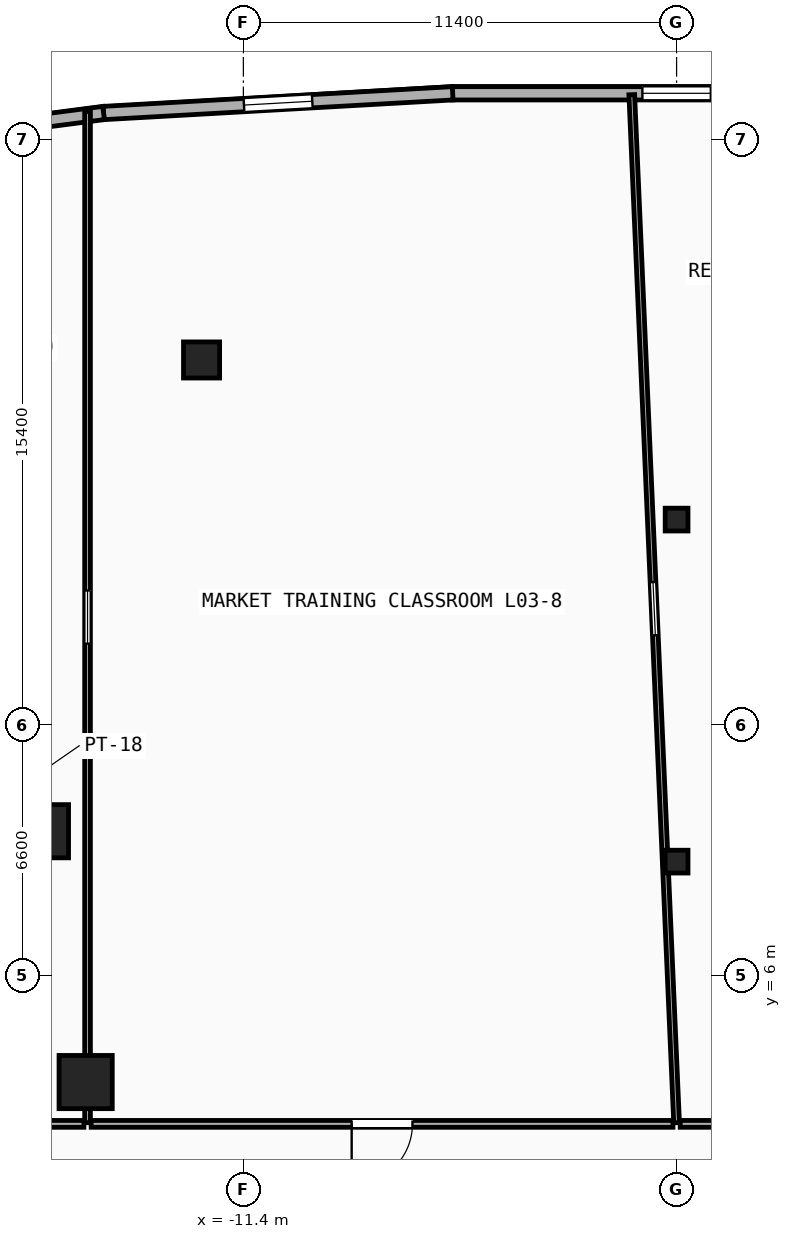
"""IFC4 building model, lengths in metres.
Left out: names, types, materials, properties, quantities, classifications, styles, units other than length and angle.
Written with IfcOpenShell. Run it as: python <this file> out.ifc"""

import sys

from ifc_helpers import new_model, si_unit, direction, frame, frame_2d, origin, origin_2d, place, context, subcontext, project, spatial, rectangle, hollow_rectangle, circle, extrude, element, fill, save


model = new_model("IFC4")
c1 = context("Model", 3, precision=1e-05, world=origin(), true_north=direction((0.0, 1.0)))
c2 = subcontext(c1, "Body", "Model", "MODEL_VIEW")
j1 = project(units=[si_unit("LENGTHUNIT", "METRE"), si_unit("PLANEANGLEUNIT", "RADIAN")], contexts=[c1])
p1 = place(None, origin())
s1 = spatial("IfcSite", under=j1, at=p1, CompositionType="ELEMENT")
p2 = place(p1, origin())
s2 = spatial("IfcBuilding", under=s1, at=p2, CompositionType="ELEMENT")
p3 = place(p2, frame((0.0, 0.0, 16.0)))
s3 = spatial("IfcBuildingStorey", under=s2, at=p3, CompositionType="ELEMENT", Elevation=16.0)
for number, where, z_axis, x_axis in (
    (1, (-15.55, 3.2, 0.0), (0.0, 0.0, 1.0), (1.0, 0.0, 0.0)),
    (2, (-16.7, 9.8, 0.0), (0.0, 0.0, 1.0), (1.0, 0.0, 0.0)),
):
    element("IfcColumn", number, at=place(p3, frame(where, z_axis=z_axis, x_axis=x_axis)), inside=s3, PredefinedType="COLUMN", context=c2, shape_type="SweptSolid", body=[
        extrude(rectangle(XDim=1.4, YDim=1.4, at=origin_2d()), origin(), (0.0, 0.0, 1.0), 4.0),
    ])
for number, where, z_axis, x_axis in (
    (3, (0.0, 9.0, 0.0), (0.0, 0.0, 1.0), (1.0, 0.0, 0.0)),
    (4, (0.0, 18.0, 0.0), (0.0, 0.0, 1.0), (1.0, 0.0, 0.0)),
):
    element("IfcColumn", number, at=place(p3, frame(where, z_axis=z_axis, x_axis=x_axis)), inside=s3, PredefinedType="COLUMN", context=c2, shape_type="SweptSolid", body=[
        extrude(hollow_rectangle(XDim=0.6, YDim=0.6, WallThickness=0.032, at=origin_2d()), origin(), (0.0, 0.0, 1.0), 4.0),
    ])
p4 = place(p3, frame((-12.5, 22.2, 0.0), z_axis=(0.0, 0.0, 1.0), x_axis=(1.0, 0.0, 0.0)))
e5 = element("IfcColumn", 5, at=p4, inside=s3, PredefinedType="PILASTER", context=c2, shape_type="SweptSolid", body=[
    extrude(circle(Radius=0.475, at=origin_2d()), origin(), (0.0, 0.0, 1.0), 4.0),
])
p5 = place(p3, frame((5.893, 29.216, 0.0), z_axis=(0.0, 0.0, 1.0), x_axis=(-1.0, 0.0, 0.0)))
e6 = element("IfcWall", 6, at=p5, inside=s3, PredefinedType="SOLIDWALL", context=c2, shape_type="SweptSolid", body=[
    extrude(rectangle(XDim=11.785, YDim=0.35, at=frame_2d((5.893, 0.0))), origin(), (0.0, 0.0, 1.0), 3.65),
])
p6 = place(p5, frame((4.992, 0.0, 0.85)))
e7 = element("IfcOpeningElement", 7, at=p6, cuts=e6, PredefinedType="OPENING", context=c2, shape_type="SweptSolid", body=[
    extrude(rectangle(XDim=1.8, YDim=2.4, at=frame_2d((0.9, 1.2))), frame((0.0, 0.185, 0.0), z_axis=(0.0, -1.0, 0.0), x_axis=(1.0, 0.0, 0.0)), (0.0, 0.0, 1.0), 0.37),
])
p7 = place(p3, frame((-5.893, 29.216, 0.0), z_axis=(0.0, 0.0, 1.0), x_axis=(-0.998413463137, -0.056307695976, 0.0)))
e8 = element("IfcWall", 8, at=p7, inside=s3, PredefinedType="SOLIDWALL", context=c2, shape_type="SweptSolid", body=[
    extrude(rectangle(XDim=9.201, YDim=0.35, at=frame_2d((4.6, 0.0))), origin(), (0.0, 0.0, 1.0), 3.65),
])
p8 = place(p7, frame((3.7, 0.0, 0.85)))
e9 = element("IfcOpeningElement", 9, at=p8, cuts=e8, PredefinedType="OPENING", context=c2, shape_type="SweptSolid", body=[
    extrude(rectangle(XDim=1.8, YDim=2.4, at=frame_2d((0.9, 1.2))), frame((0.0, 0.185, 0.0), z_axis=(0.0, -1.0, 0.0), x_axis=(1.0, 0.0, 0.0)), (0.0, 0.0, 1.0), 0.37),
])
p9 = place(p3, frame((-15.079, 28.698, 0.0), z_axis=(0.0, 0.0, 1.0), x_axis=(-0.991688106477, -0.128665067026, 0.0)))
e10 = element("IfcWall", 10, at=p9, inside=s3, PredefinedType="SOLIDWALL", context=c2, shape_type="SweptSolid", body=[
    extrude(rectangle(XDim=8.129, YDim=0.35, at=frame_2d((4.064, 0.0))), origin(), (0.0, 0.0, 1.0), 3.65),
])
p10 = place(p9, frame((3.164, 0.0, 0.85)))
e11 = element("IfcOpeningElement", 11, at=p10, cuts=e10, PredefinedType="OPENING", context=c2, shape_type="SweptSolid", body=[
    extrude(rectangle(XDim=1.8, YDim=2.4, at=frame_2d((0.9, 1.2))), frame((0.0, 0.185, 0.0), z_axis=(0.0, -1.0, 0.0), x_axis=(1.0, 0.0, 0.0)), (0.0, 0.0, 1.0), 0.37),
])
p11 = place(p3, frame((-15.5, 2.13, 0.0), z_axis=(0.0, 0.0, 1.0), x_axis=(0.0, 1.0, 0.0)))
e12 = element("IfcWall", 12, at=p11, inside=s3, PredefinedType="PARTITIONING", context=c2, shape_type="SweptSolid", body=[
    extrude(rectangle(XDim=26.61, YDim=0.15, at=frame_2d((13.305, 0.0))), origin(), (0.0, 0.0, 1.0), 2.877),
])
p12 = place(p11, frame((12.605, 0.0, 1.05)))
e13 = element("IfcOpeningElement", 13, at=p12, cuts=e12, PredefinedType="OPENING", context=c2, shape_type="SweptSolid", body=[
    extrude(rectangle(XDim=1.4, YDim=1.5, at=frame_2d((0.7, 0.75))), frame((0.0, 0.085, 0.0), z_axis=(0.0, -1.0, 0.0), x_axis=(1.0, 0.0, 0.0)), (0.0, 0.0, 1.0), 0.17),
])
p13 = place(p3, frame((0.0, 2.13, 0.0), z_axis=(0.0, 0.0, 1.0), x_axis=(-0.043560875221, 0.999050774561, 0.0)))
e14 = element("IfcWall", 14, at=p13, inside=s3, PredefinedType="PARTITIONING", context=c2, shape_type="SweptSolid", body=[
    extrude(rectangle(XDim=27.076, YDim=0.15, at=frame_2d((13.538, 0.0))), origin(), (0.0, 0.0, 1.0), 2.877),
])
p14 = place(p13, frame((12.838, 0.0, 1.05)))
e15 = element("IfcOpeningElement", 15, at=p14, cuts=e14, PredefinedType="OPENING", context=c2, shape_type="SweptSolid", body=[
    extrude(rectangle(XDim=1.4, YDim=1.5, at=frame_2d((0.7, 0.75))), frame((0.0, 0.085, 0.0), z_axis=(0.0, -1.0, 0.0), x_axis=(1.0, 0.0, 0.0)), (0.0, 0.0, 1.0), 0.17),
])
p15 = place(p3, frame((-0.095, 2.1, 0.0), z_axis=(0.0, 0.0, 1.0), x_axis=(-1.0, 0.0, 0.0)))
e16 = element("IfcWall", 16, at=p15, inside=s3, PredefinedType="PARTITIONING", context=c2, shape_type="SweptSolid", body=[
    extrude(rectangle(XDim=15.31, YDim=0.18, at=frame_2d((7.655, 0.0))), origin(), (0.0, 0.0, 1.0), 2.877),
])
p16 = place(p15, frame((6.855, 0.0, 0.0)))
e17 = element("IfcOpeningElement", 17, at=p16, cuts=e16, PredefinedType="OPENING", context=c2, shape_type="SweptSolid", body=[
    extrude(rectangle(XDim=1.6, YDim=2.2, at=frame_2d((0.8, 1.1))), frame((0.0, 0.1, 0.0), z_axis=(0.0, -1.0, 0.0), x_axis=(1.0, 0.0, 0.0)), (0.0, 0.0, 1.0), 0.2),
])
p17 = place(p3, frame((8.1, 2.1, 0.0), z_axis=(0.0, 0.0, 1.0), x_axis=(-1.0, 0.0, 0.0)))
e18 = element("IfcWall", 18, at=p17, inside=s3, PredefinedType="PARTITIONING", context=c2, shape_type="SweptSolid", body=[
    extrude(rectangle(XDim=8.005, YDim=0.18, at=frame_2d((4.002, 0.0))), origin(), (0.0, 0.0, 1.0), 3.65),
])
p18 = place(p17, frame((3.302, 0.0, 1.05)))
e19 = element("IfcOpeningElement", 19, at=p18, cuts=e18, PredefinedType="OPENING", context=c2, shape_type="SweptSolid", body=[
    extrude(rectangle(XDim=1.4, YDim=1.5, at=frame_2d((0.7, 0.75))), frame((0.0, 0.1, 0.0), z_axis=(0.0, -1.0, 0.0), x_axis=(1.0, 0.0, 0.0)), (0.0, 0.0, 1.0), 0.2),
])
p19 = place(p3, frame((-15.595, 2.1, 0.0), z_axis=(0.0, 0.0, 1.0), x_axis=(-1.0, 0.0, 0.0)))
e20 = element("IfcWall", 20, at=p19, inside=s3, PredefinedType="PARTITIONING", context=c2, shape_type="SweptSolid", body=[
    extrude(rectangle(XDim=1.445, YDim=0.18, at=frame_2d((0.723, 0.0))), origin(), (0.0, 0.0, 1.0), 3.65),
])
p20 = place(p6, origin())
e21 = element("IfcWindow", 21, at=p20, inside=s3, PartitioningType="SINGLE_PANEL", PredefinedType="WINDOW", context=c2, shape_type="SweptSolid", body=[
    extrude(rectangle(XDim=1.8, YDim=2.4, at=frame_2d((0.9, 1.2))), frame((0.0, 0.03, 0.0), z_axis=(0.0, -1.0, 0.0), x_axis=(1.0, 0.0, 0.0)), (0.0, 0.0, 1.0), 0.06),
])
fill(e7, e21)
p21 = place(p8, origin())
e22 = element("IfcWindow", 22, at=p21, inside=s3, PartitioningType="SINGLE_PANEL", PredefinedType="WINDOW", context=c2, shape_type="SweptSolid", body=[
    extrude(rectangle(XDim=1.8, YDim=2.4, at=frame_2d((0.9, 1.2))), frame((0.0, 0.03, 0.0), z_axis=(0.0, -1.0, 0.0), x_axis=(1.0, 0.0, 0.0)), (0.0, 0.0, 1.0), 0.06),
])
fill(e9, e22)
p22 = place(p16, origin())
e23 = element("IfcDoor", 23, at=p22, inside=s3, OperationType="SINGLE_SWING_RIGHT", PredefinedType="DOOR", context=c2, shape_type="SweptSolid", body=[
    extrude(rectangle(XDim=1.6, YDim=2.2, at=frame_2d((0.8, 1.1))), frame((0.0, 0.025, 0.0), z_axis=(0.0, -1.0, 0.0), x_axis=(1.0, 0.0, 0.0)), (0.0, 0.0, 1.0), 0.05),
])
fill(e17, e23)
p23 = place(p12, origin())
e24 = element("IfcWindow", 24, at=p23, inside=s3, PartitioningType="SINGLE_PANEL", PredefinedType="WINDOW", context=c2, shape_type="SweptSolid", body=[
    extrude(rectangle(XDim=1.4, YDim=1.5, at=frame_2d((0.7, 0.75))), frame((0.0, 0.03, 0.0), z_axis=(0.0, -1.0, 0.0), x_axis=(1.0, 0.0, 0.0)), (0.0, 0.0, 1.0), 0.06),
])
fill(e13, e24)
p24 = place(p14, origin())
e25 = element("IfcWindow", 25, at=p24, inside=s3, PartitioningType="SINGLE_PANEL", PredefinedType="WINDOW", context=c2, shape_type="SweptSolid", body=[
    extrude(rectangle(XDim=1.4, YDim=1.5, at=frame_2d((0.7, 0.75))), frame((0.0, 0.03, 0.0), z_axis=(0.0, -1.0, 0.0), x_axis=(1.0, 0.0, 0.0)), (0.0, 0.0, 1.0), 0.06),
])
fill(e15, e25)
save(model, sys.argv[1])
